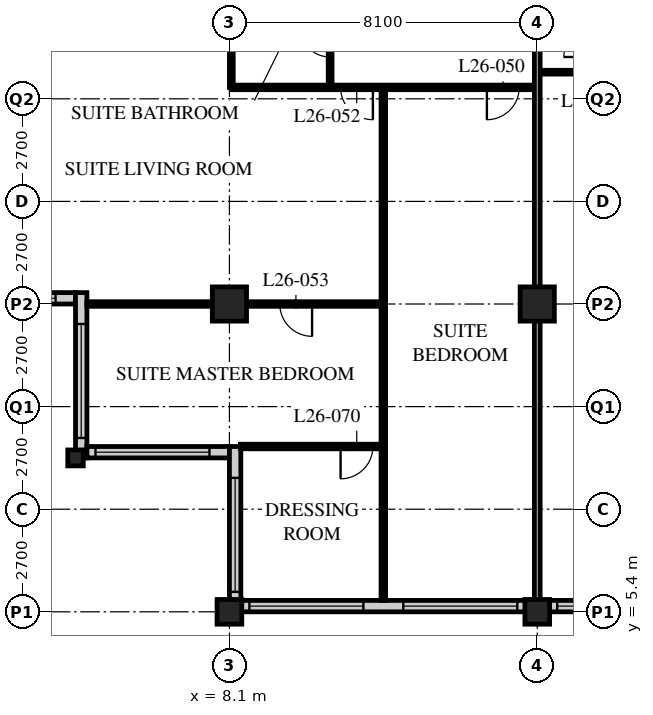
"""IFC4 building model, lengths in metres.
Left out: names, types, materials, properties, quantities, classifications, styles, units other than length and angle.
Written with IfcOpenShell. Run it as: python <this file> out.ifc"""

import sys

from ifc_helpers import new_model, si_unit, direction, frame, frame_2d, origin, origin_2d, place, context, subcontext, project, spatial, rectangle, hollow_rectangle, i_section, extrude, element, fill, save


model = new_model("IFC4")
c1 = context("Model", 3, precision=1e-05, world=origin(), true_north=direction((0.0, 1.0)))
c2 = subcontext(c1, "Body", "Model", "MODEL_VIEW")
j1 = project(units=[si_unit("LENGTHUNIT", "METRE"), si_unit("PLANEANGLEUNIT", "RADIAN")], contexts=[c1])
p1 = place(None, origin())
s1 = spatial("IfcSite", under=j1, at=p1, CompositionType="ELEMENT")
p2 = place(p1, origin())
s2 = spatial("IfcBuilding", under=s1, at=p2, CompositionType="ELEMENT")
p3 = place(p2, frame((0.0, 0.0, 106.8)))
s3 = spatial("IfcBuildingStorey", under=s2, at=p3, CompositionType="ELEMENT", Elevation=106.8)
p4 = place(p3, frame((4.05, 9.45, 0.0), z_axis=(0.0, 0.0, 1.0), x_axis=(1.0, 0.0, 0.0)))
e1 = element("IfcColumn", 1, at=p4, inside=s3, PredefinedType="COLUMN", context=c2, shape_type="SweptSolid", body=[
    extrude(i_section(OverallWidth=0.407, OverallDepth=0.419, WebThickness=0.031, FlangeThickness=0.049, FilletRadius=0.015, at=origin_2d()), origin(), (0.0, 0.0, 1.0), 3.4),
])
p5 = place(p3, frame((8.1, 5.4, 0.0), z_axis=(0.0, 0.0, 1.0), x_axis=(1.0, 0.0, 0.0)))
e2 = element("IfcColumn", 2, at=p5, inside=s3, PredefinedType="COLUMN", context=c2, shape_type="SweptSolid", body=[
    extrude(hollow_rectangle(XDim=0.65, YDim=0.65, WallThickness=0.055, at=origin_2d()), origin(), (0.0, 0.0, 1.0), 3.4),
])
p6 = place(p3, frame((8.1, 13.5, 0.0), z_axis=(0.0, 0.0, 1.0), x_axis=(1.0, 0.0, 0.0)))
e3 = element("IfcColumn", 3, at=p6, inside=s3, PredefinedType="COLUMN", context=c2, shape_type="SweptSolid", body=[
    extrude(hollow_rectangle(XDim=0.9, YDim=0.9, WallThickness=0.09, at=origin_2d()), origin(), (0.0, 0.0, 1.0), 3.4),
])
p7 = place(p3, frame((16.2, 5.4, 0.0), z_axis=(0.0, 0.0, 1.0), x_axis=(1.0, 0.0, 0.0)))
e4 = element("IfcColumn", 4, at=p7, inside=s3, PredefinedType="COLUMN", context=c2, shape_type="SweptSolid", body=[
    extrude(hollow_rectangle(XDim=0.65, YDim=0.65, WallThickness=0.055, at=origin_2d()), origin(), (0.0, 0.0, 1.0), 3.4),
])
p8 = place(p3, frame((16.2, 13.5, 0.0), z_axis=(0.0, 0.0, 1.0), x_axis=(1.0, 0.0, 0.0)))
e5 = element("IfcColumn", 5, at=p8, inside=s3, PredefinedType="COLUMN", context=c2, shape_type="SweptSolid", body=[
    extrude(hollow_rectangle(XDim=0.9, YDim=0.9, WallThickness=0.09, at=origin_2d()), origin(), (0.0, 0.0, 1.0), 3.4),
])
p9 = place(p3, frame((8.4, 5.55, 0.0), z_axis=(0.0, 0.0, 1.0), x_axis=(1.0, 0.0, 0.0)))
e6 = element("IfcWall", 6, at=p9, inside=s3, PredefinedType="SOLIDWALL", context=c2, shape_type="SweptSolid", body=[
    extrude(rectangle(XDim=40.2, YDim=0.3, at=frame_2d((20.1, 0.0))), origin(), (0.0, 0.0, 1.0), 3.19),
])
p10 = place(p9, frame((0.225, 0.0, 0.9)))
e7 = element("IfcOpeningElement", 7, at=p10, cuts=e6, PredefinedType="OPENING", context=c2, shape_type="SweptSolid", body=[
    extrude(rectangle(XDim=3.0, YDim=2.0, at=frame_2d((1.5, 1.0))), frame((0.0, 0.16, 0.0), z_axis=(0.0, -1.0, 0.0), x_axis=(1.0, 0.0, 0.0)), (0.0, 0.0, 1.0), 0.32),
])
p11 = place(p9, frame((4.275, 0.0, 0.9)))
e8 = element("IfcOpeningElement", 8, at=p11, cuts=e6, PredefinedType="OPENING", context=c2, shape_type="SweptSolid", body=[
    extrude(rectangle(XDim=3.0, YDim=2.0, at=frame_2d((1.5, 1.0))), frame((0.0, 0.16, 0.0), z_axis=(0.0, -1.0, 0.0), x_axis=(1.0, 0.0, 0.0)), (0.0, 0.0, 1.0), 0.32),
])
p12 = place(p9, frame((8.325, 0.0, 0.9)))
e9 = element("IfcOpeningElement", 9, at=p12, cuts=e6, PredefinedType="OPENING", context=c2, shape_type="SweptSolid", body=[
    extrude(rectangle(XDim=3.0, YDim=2.0, at=frame_2d((1.5, 1.0))), frame((0.0, 0.16, 0.0), z_axis=(0.0, -1.0, 0.0), x_axis=(1.0, 0.0, 0.0)), (0.0, 0.0, 1.0), 0.32),
])
p13 = place(p9, frame((12.375, 0.0, 0.9)))
e10 = element("IfcOpeningElement", 10, at=p13, cuts=e6, PredefinedType="OPENING", context=c2, shape_type="SweptSolid", body=[
    extrude(rectangle(XDim=3.0, YDim=2.0, at=frame_2d((1.5, 1.0))), frame((0.0, 0.16, 0.0), z_axis=(0.0, -1.0, 0.0), x_axis=(1.0, 0.0, 0.0)), (0.0, 0.0, 1.0), 0.32),
])
p14 = place(p9, frame((16.425, 0.0, 0.9)))
e11 = element("IfcOpeningElement", 11, at=p14, cuts=e6, PredefinedType="OPENING", context=c2, shape_type="SweptSolid", body=[
    extrude(rectangle(XDim=3.0, YDim=2.0, at=frame_2d((1.5, 1.0))), frame((0.0, 0.16, 0.0), z_axis=(0.0, -1.0, 0.0), x_axis=(1.0, 0.0, 0.0)), (0.0, 0.0, 1.0), 0.32),
])
p15 = place(p9, frame((20.475, 0.0, 0.9)))
e12 = element("IfcOpeningElement", 12, at=p15, cuts=e6, PredefinedType="OPENING", context=c2, shape_type="SweptSolid", body=[
    extrude(rectangle(XDim=3.0, YDim=2.0, at=frame_2d((1.5, 1.0))), frame((0.0, 0.16, 0.0), z_axis=(0.0, -1.0, 0.0), x_axis=(1.0, 0.0, 0.0)), (0.0, 0.0, 1.0), 0.32),
])
p16 = place(p9, frame((24.525, 0.0, 0.9)))
e13 = element("IfcOpeningElement", 13, at=p16, cuts=e6, PredefinedType="OPENING", context=c2, shape_type="SweptSolid", body=[
    extrude(rectangle(XDim=3.0, YDim=2.0, at=frame_2d((1.5, 1.0))), frame((0.0, 0.16, 0.0), z_axis=(0.0, -1.0, 0.0), x_axis=(1.0, 0.0, 0.0)), (0.0, 0.0, 1.0), 0.32),
])
p17 = place(p9, frame((28.575, 0.0, 0.9)))
e14 = element("IfcOpeningElement", 14, at=p17, cuts=e6, PredefinedType="OPENING", context=c2, shape_type="SweptSolid", body=[
    extrude(rectangle(XDim=3.0, YDim=2.0, at=frame_2d((1.5, 1.0))), frame((0.0, 0.16, 0.0), z_axis=(0.0, -1.0, 0.0), x_axis=(1.0, 0.0, 0.0)), (0.0, 0.0, 1.0), 0.32),
])
p18 = place(p9, frame((32.625, 0.0, 0.9)))
e15 = element("IfcOpeningElement", 15, at=p18, cuts=e6, PredefinedType="OPENING", context=c2, shape_type="SweptSolid", body=[
    extrude(rectangle(XDim=3.0, YDim=2.0, at=frame_2d((1.5, 1.0))), frame((0.0, 0.16, 0.0), z_axis=(0.0, -1.0, 0.0), x_axis=(1.0, 0.0, 0.0)), (0.0, 0.0, 1.0), 0.32),
])
p19 = place(p9, frame((36.675, 0.0, 0.9)))
e16 = element("IfcOpeningElement", 16, at=p19, cuts=e6, PredefinedType="OPENING", context=c2, shape_type="SweptSolid", body=[
    extrude(rectangle(XDim=3.0, YDim=2.0, at=frame_2d((1.5, 1.0))), frame((0.0, 0.16, 0.0), z_axis=(0.0, -1.0, 0.0), x_axis=(1.0, 0.0, 0.0)), (0.0, 0.0, 1.0), 0.32),
])
p20 = place(p3, frame((0.3, 13.65, 0.0), z_axis=(0.0, 0.0, 1.0), x_axis=(1.0, 0.0, 0.0)))
e17 = element("IfcWall", 17, at=p20, inside=s3, PredefinedType="SOLIDWALL", context=c2, shape_type="SweptSolid", body=[
    extrude(rectangle(XDim=3.75, YDim=0.3, at=frame_2d((1.875, 0.0))), origin(), (0.0, 0.0, 1.0), 3.19),
])
p21 = place(p20, frame((0.225, 0.0, 0.9)))
e18 = element("IfcOpeningElement", 18, at=p21, cuts=e17, PredefinedType="OPENING", context=c2, shape_type="SweptSolid", body=[
    extrude(rectangle(XDim=3.0, YDim=1.5, at=frame_2d((1.5, 0.75))), frame((0.0, 0.16, 0.0), z_axis=(0.0, -1.0, 0.0), x_axis=(1.0, 0.0, 0.0)), (0.0, 0.0, 1.0), 0.32),
])
p22 = place(p3, frame((4.2, 13.8, 0.0), z_axis=(0.0, 0.0, 1.0), x_axis=(0.0, -1.0, 0.0)))
e19 = element("IfcWall", 19, at=p22, inside=s3, PredefinedType="SOLIDWALL", context=c2, shape_type="SweptSolid", body=[
    extrude(rectangle(XDim=4.35, YDim=0.3, at=frame_2d((2.175, 0.0))), origin(), (0.0, 0.0, 1.0), 3.19),
])
p23 = place(p22, frame((0.825, 0.0, 0.9)))
e20 = element("IfcOpeningElement", 20, at=p23, cuts=e19, PredefinedType="OPENING", context=c2, shape_type="SweptSolid", body=[
    extrude(rectangle(XDim=3.0, YDim=1.5, at=frame_2d((1.5, 0.75))), frame((0.0, 0.16, 0.0), z_axis=(0.0, -1.0, 0.0), x_axis=(1.0, 0.0, 0.0)), (0.0, 0.0, 1.0), 0.32),
])
p24 = place(p3, frame((4.35, 9.6, 0.0), z_axis=(0.0, 0.0, 1.0), x_axis=(1.0, 0.0, 0.0)))
e21 = element("IfcWall", 21, at=p24, inside=s3, PredefinedType="SOLIDWALL", context=c2, shape_type="SweptSolid", body=[
    extrude(rectangle(XDim=3.75, YDim=0.3, at=frame_2d((1.875, 0.0))), origin(), (0.0, 0.0, 1.0), 3.19),
])
p25 = place(p24, frame((0.225, 0.0, 0.9)))
e22 = element("IfcOpeningElement", 22, at=p25, cuts=e21, PredefinedType="OPENING", context=c2, shape_type="SweptSolid", body=[
    extrude(rectangle(XDim=3.0, YDim=1.5, at=frame_2d((1.5, 0.75))), frame((0.0, 0.16, 0.0), z_axis=(0.0, -1.0, 0.0), x_axis=(1.0, 0.0, 0.0)), (0.0, 0.0, 1.0), 0.32),
])
p26 = place(p3, frame((8.25, 9.75, 0.0), z_axis=(0.0, 0.0, 1.0), x_axis=(0.0, -1.0, 0.0)))
e23 = element("IfcWall", 23, at=p26, inside=s3, PredefinedType="SOLIDWALL", context=c2, shape_type="SweptSolid", body=[
    extrude(rectangle(XDim=4.35, YDim=0.3, at=frame_2d((2.175, 0.0))), origin(), (0.0, 0.0, 1.0), 3.19),
])
p27 = place(p26, frame((0.825, 0.0, 0.9)))
e24 = element("IfcOpeningElement", 24, at=p27, cuts=e23, PredefinedType="OPENING", context=c2, shape_type="SweptSolid", body=[
    extrude(rectangle(XDim=3.0, YDim=1.5, at=frame_2d((1.5, 0.75))), frame((0.0, 0.16, 0.0), z_axis=(0.0, -1.0, 0.0), x_axis=(1.0, 0.0, 0.0)), (0.0, 0.0, 1.0), 0.32),
])
p28 = place(p3, frame((16.2, 19.6, 0.0), z_axis=(0.0, 0.0, 1.0), x_axis=(1.0, 0.0, 0.0)))
e25 = element("IfcWall", 25, at=p28, inside=s3, PredefinedType="PARTITIONING", context=c2, shape_type="SweptSolid", body=[
    extrude(rectangle(XDim=1.5, YDim=0.1, at=frame_2d((0.75, 0.0))), origin(), (0.0, 0.0, 1.0), 3.19),
])
p29 = place(p3, frame((10.75, 21.6, 0.0), z_axis=(0.0, 0.0, 1.0), x_axis=(0.0, -1.0, 0.0)))
e26 = element("IfcWall", 26, at=p29, inside=s3, PredefinedType="PARTITIONING", context=c2, shape_type="SweptSolid", body=[
    extrude(rectangle(XDim=2.4, YDim=0.1, at=frame_2d((1.2, 0.0))), origin(), (0.0, 0.0, 1.0), 3.19),
])
p30 = place(p29, frame((0.8, 0.0, 0.0)))
e27 = element("IfcOpeningElement", 27, at=p30, cuts=e26, PredefinedType="OPENING", context=c2, shape_type="SweptSolid", body=[
    extrude(rectangle(XDim=0.8, YDim=2.1, at=frame_2d((0.4, 1.05))), frame((0.0, 0.06, 0.0), z_axis=(0.0, -1.0, 0.0), x_axis=(1.0, 0.0, 0.0)), (0.0, 0.0, 1.0), 0.12),
])
p31 = place(p3, frame((8.15, 21.6, 0.0), z_axis=(0.0, 0.0, 1.0), x_axis=(0.0, -1.0, 0.0)))
e28 = element("IfcWall", 28, at=p31, inside=s3, PredefinedType="PARTITIONING", context=c2, shape_type="SweptSolid", body=[
    extrude(rectangle(XDim=2.4, YDim=0.1, at=frame_2d((1.2, 0.0))), origin(), (0.0, 0.0, 1.0), 2.578),
])
p32 = place(p3, frame((8.15, 19.2, 0.0), z_axis=(0.0, 0.0, 1.0), x_axis=(1.0, 0.0, 0.0)))
e29 = element("IfcWall", 29, at=p32, inside=s3, PredefinedType="PARTITIONING", context=c2, shape_type="SweptSolid", body=[
    extrude(rectangle(XDim=8.05, YDim=0.12, at=frame_2d((4.025, 0.0))), origin(), (0.0, 0.0, 1.0), 3.19),
])
p33 = place(p32, frame((6.725, 0.0, 0.0)))
e30 = element("IfcOpeningElement", 30, at=p33, cuts=e29, PredefinedType="OPENING", context=c2, shape_type="SweptSolid", body=[
    extrude(rectangle(XDim=0.85, YDim=2.1, at=frame_2d((0.425, 1.05))), frame((0.0, 0.07, 0.0), z_axis=(0.0, -1.0, 0.0), x_axis=(1.0, 0.0, 0.0)), (0.0, 0.0, 1.0), 0.14),
])
p34 = place(p32, frame((2.875, 0.0, 0.0)))
e31 = element("IfcOpeningElement", 31, at=p34, cuts=e29, PredefinedType="OPENING", context=c2, shape_type="SweptSolid", body=[
    extrude(rectangle(XDim=0.85, YDim=2.1, at=frame_2d((0.425, 1.05))), frame((0.0, 0.07, 0.0), z_axis=(0.0, -1.0, 0.0), x_axis=(1.0, 0.0, 0.0)), (0.0, 0.0, 1.0), 0.14),
])
p35 = place(p3, frame((12.15, 19.2, 0.0), z_axis=(0.0, 0.0, 1.0), x_axis=(0.0, -1.0, 0.0)))
e32 = element("IfcWall", 32, at=p35, inside=s3, PredefinedType="PARTITIONING", context=c2, shape_type="SweptSolid", body=[
    extrude(rectangle(XDim=13.5, YDim=0.12, at=frame_2d((6.75, 0.0))), origin(), (0.0, 0.0, 1.0), 3.19),
])
p36 = place(p3, frame((12.15, 13.5, 0.0), z_axis=(0.0, 0.0, 1.0), x_axis=(-1.0, 0.0, 0.0)))
e33 = element("IfcWall", 33, at=p36, inside=s3, PredefinedType="PARTITIONING", context=c2, shape_type="SweptSolid", body=[
    extrude(rectangle(XDim=7.8, YDim=0.12, at=frame_2d((3.9, 0.0))), origin(), (0.0, 0.0, 1.0), 2.578),
])
p37 = place(p36, frame((1.875, 0.0, 0.0)))
e34 = element("IfcOpeningElement", 34, at=p37, cuts=e33, PredefinedType="OPENING", context=c2, shape_type="SweptSolid", body=[
    extrude(rectangle(XDim=0.85, YDim=2.1, at=frame_2d((0.425, 1.05))), frame((0.0, 0.07, 0.0), z_axis=(0.0, -1.0, 0.0), x_axis=(1.0, 0.0, 0.0)), (0.0, 0.0, 1.0), 0.14),
])
p38 = place(p3, frame((16.2, 21.6, 0.0), z_axis=(0.0, 0.0, 1.0), x_axis=(0.0, -1.0, 0.0)))
e35 = element("IfcWall", 35, at=p38, inside=s3, PredefinedType="PARTITIONING", context=c2, shape_type="SweptSolid", body=[
    extrude(rectangle(XDim=15.9, YDim=0.15, at=frame_2d((7.95, 0.0))), origin(), (0.0, 0.0, 1.0), 2.578),
])
p39 = place(p3, frame((8.39, 9.75, 0.0), z_axis=(0.0, 0.0, 1.0), x_axis=(1.0, 0.0, 0.0)))
e36 = element("IfcWall", 36, at=p39, inside=s3, PredefinedType="PARTITIONING", context=c2, shape_type="SweptSolid", body=[
    extrude(rectangle(XDim=3.76, YDim=0.12, at=frame_2d((1.88, 0.0))), origin(), (0.0, 0.0, 1.0), 3.19),
])
p40 = place(p39, frame((2.635, 0.0, 0.0)))
e37 = element("IfcOpeningElement", 37, at=p40, cuts=e36, PredefinedType="OPENING", context=c2, shape_type="SweptSolid", body=[
    extrude(rectangle(XDim=0.85, YDim=2.1, at=frame_2d((0.425, 1.05))), frame((0.0, 0.07, 0.0), z_axis=(0.0, -1.0, 0.0), x_axis=(1.0, 0.0, 0.0)), (0.0, 0.0, 1.0), 0.14),
])
p41 = place(p10, origin())
e38 = element("IfcWindow", 38, at=p41, inside=s3, PartitioningType="SINGLE_PANEL", PredefinedType="WINDOW", context=c2, shape_type="SweptSolid", body=[
    extrude(rectangle(XDim=3.0, YDim=2.0, at=frame_2d((1.5, 1.0))), frame((0.0, 0.03, 0.0), z_axis=(0.0, -1.0, 0.0), x_axis=(1.0, 0.0, 0.0)), (0.0, 0.0, 1.0), 0.06),
])
fill(e7, e38)
p42 = place(p11, origin())
e39 = element("IfcWindow", 39, at=p42, inside=s3, PartitioningType="SINGLE_PANEL", PredefinedType="WINDOW", context=c2, shape_type="SweptSolid", body=[
    extrude(rectangle(XDim=3.0, YDim=2.0, at=frame_2d((1.5, 1.0))), frame((0.0, 0.03, 0.0), z_axis=(0.0, -1.0, 0.0), x_axis=(1.0, 0.0, 0.0)), (0.0, 0.0, 1.0), 0.06),
])
fill(e8, e39)
p43 = place(p12, origin())
e40 = element("IfcWindow", 40, at=p43, inside=s3, PartitioningType="SINGLE_PANEL", PredefinedType="WINDOW", context=c2, shape_type="SweptSolid", body=[
    extrude(rectangle(XDim=3.0, YDim=2.0, at=frame_2d((1.5, 1.0))), frame((0.0, 0.03, 0.0), z_axis=(0.0, -1.0, 0.0), x_axis=(1.0, 0.0, 0.0)), (0.0, 0.0, 1.0), 0.06),
])
fill(e9, e40)
p44 = place(p21, origin())
e41 = element("IfcWindow", 41, at=p44, inside=s3, PartitioningType="SINGLE_PANEL", PredefinedType="WINDOW", context=c2, shape_type="SweptSolid", body=[
    extrude(rectangle(XDim=3.0, YDim=1.5, at=frame_2d((1.5, 0.75))), frame((0.0, 0.03, 0.0), z_axis=(0.0, -1.0, 0.0), x_axis=(1.0, 0.0, 0.0)), (0.0, 0.0, 1.0), 0.06),
])
fill(e18, e41)
p45 = place(p23, origin())
e42 = element("IfcWindow", 42, at=p45, inside=s3, PartitioningType="SINGLE_PANEL", PredefinedType="WINDOW", context=c2, shape_type="SweptSolid", body=[
    extrude(rectangle(XDim=3.0, YDim=1.5, at=frame_2d((1.5, 0.75))), frame((0.0, 0.03, 0.0), z_axis=(0.0, -1.0, 0.0), x_axis=(1.0, 0.0, 0.0)), (0.0, 0.0, 1.0), 0.06),
])
fill(e20, e42)
p46 = place(p25, origin())
e43 = element("IfcWindow", 43, at=p46, inside=s3, PartitioningType="SINGLE_PANEL", PredefinedType="WINDOW", context=c2, shape_type="SweptSolid", body=[
    extrude(rectangle(XDim=3.0, YDim=1.5, at=frame_2d((1.5, 0.75))), frame((0.0, 0.03, 0.0), z_axis=(0.0, -1.0, 0.0), x_axis=(1.0, 0.0, 0.0)), (0.0, 0.0, 1.0), 0.06),
])
fill(e22, e43)
p47 = place(p27, origin())
e44 = element("IfcWindow", 44, at=p47, inside=s3, PartitioningType="SINGLE_PANEL", PredefinedType="WINDOW", context=c2, shape_type="SweptSolid", body=[
    extrude(rectangle(XDim=3.0, YDim=1.5, at=frame_2d((1.5, 0.75))), frame((0.0, 0.03, 0.0), z_axis=(0.0, -1.0, 0.0), x_axis=(1.0, 0.0, 0.0)), (0.0, 0.0, 1.0), 0.06),
])
fill(e24, e44)
p48 = place(p33, origin())
e45 = element("IfcDoor", 45, at=p48, inside=s3, OperationType="SINGLE_SWING_RIGHT", PredefinedType="DOOR", context=c2, shape_type="SweptSolid", body=[
    extrude(rectangle(XDim=0.85, YDim=2.1, at=frame_2d((0.425, 1.05))), frame((0.0, 0.025, 0.0), z_axis=(0.0, -1.0, 0.0), x_axis=(1.0, 0.0, 0.0)), (0.0, 0.0, 1.0), 0.05),
])
fill(e30, e45)
p49 = place(p30, origin())
e46 = element("IfcDoor", 46, at=p49, inside=s3, OperationType="SINGLE_SWING_RIGHT", PredefinedType="DOOR", context=c2, shape_type="SweptSolid", body=[
    extrude(rectangle(XDim=0.8, YDim=2.1, at=frame_2d((0.4, 1.05))), frame((0.0, 0.025, 0.0), z_axis=(0.0, -1.0, 0.0), x_axis=(1.0, 0.0, 0.0)), (0.0, 0.0, 1.0), 0.05),
])
fill(e27, e46)
p50 = place(p34, origin())
e47 = element("IfcDoor", 47, at=p50, inside=s3, OperationType="SINGLE_SWING_LEFT", PredefinedType="DOOR", context=c2, shape_type="SweptSolid", body=[
    extrude(rectangle(XDim=0.85, YDim=2.1, at=frame_2d((0.425, 1.05))), frame((0.0, 0.025, 0.0), z_axis=(0.0, -1.0, 0.0), x_axis=(1.0, 0.0, 0.0)), (0.0, 0.0, 1.0), 0.05),
])
fill(e31, e47)
p51 = place(p37, origin())
e48 = element("IfcDoor", 48, at=p51, inside=s3, OperationType="SINGLE_SWING_LEFT", PredefinedType="DOOR", context=c2, shape_type="SweptSolid", body=[
    extrude(rectangle(XDim=0.85, YDim=2.1, at=frame_2d((0.425, 1.05))), frame((0.0, 0.025, 0.0), z_axis=(0.0, -1.0, 0.0), x_axis=(1.0, 0.0, 0.0)), (0.0, 0.0, 1.0), 0.05),
])
fill(e34, e48)
p52 = place(p40, origin())
e49 = element("IfcDoor", 49, at=p52, inside=s3, OperationType="SINGLE_SWING_RIGHT", PredefinedType="DOOR", context=c2, shape_type="SweptSolid", body=[
    extrude(rectangle(XDim=0.85, YDim=2.1, at=frame_2d((0.425, 1.05))), frame((0.0, 0.025, 0.0), z_axis=(0.0, -1.0, 0.0), x_axis=(1.0, 0.0, 0.0)), (0.0, 0.0, 1.0), 0.05),
])
fill(e37, e49)
save(model, sys.argv[1])
